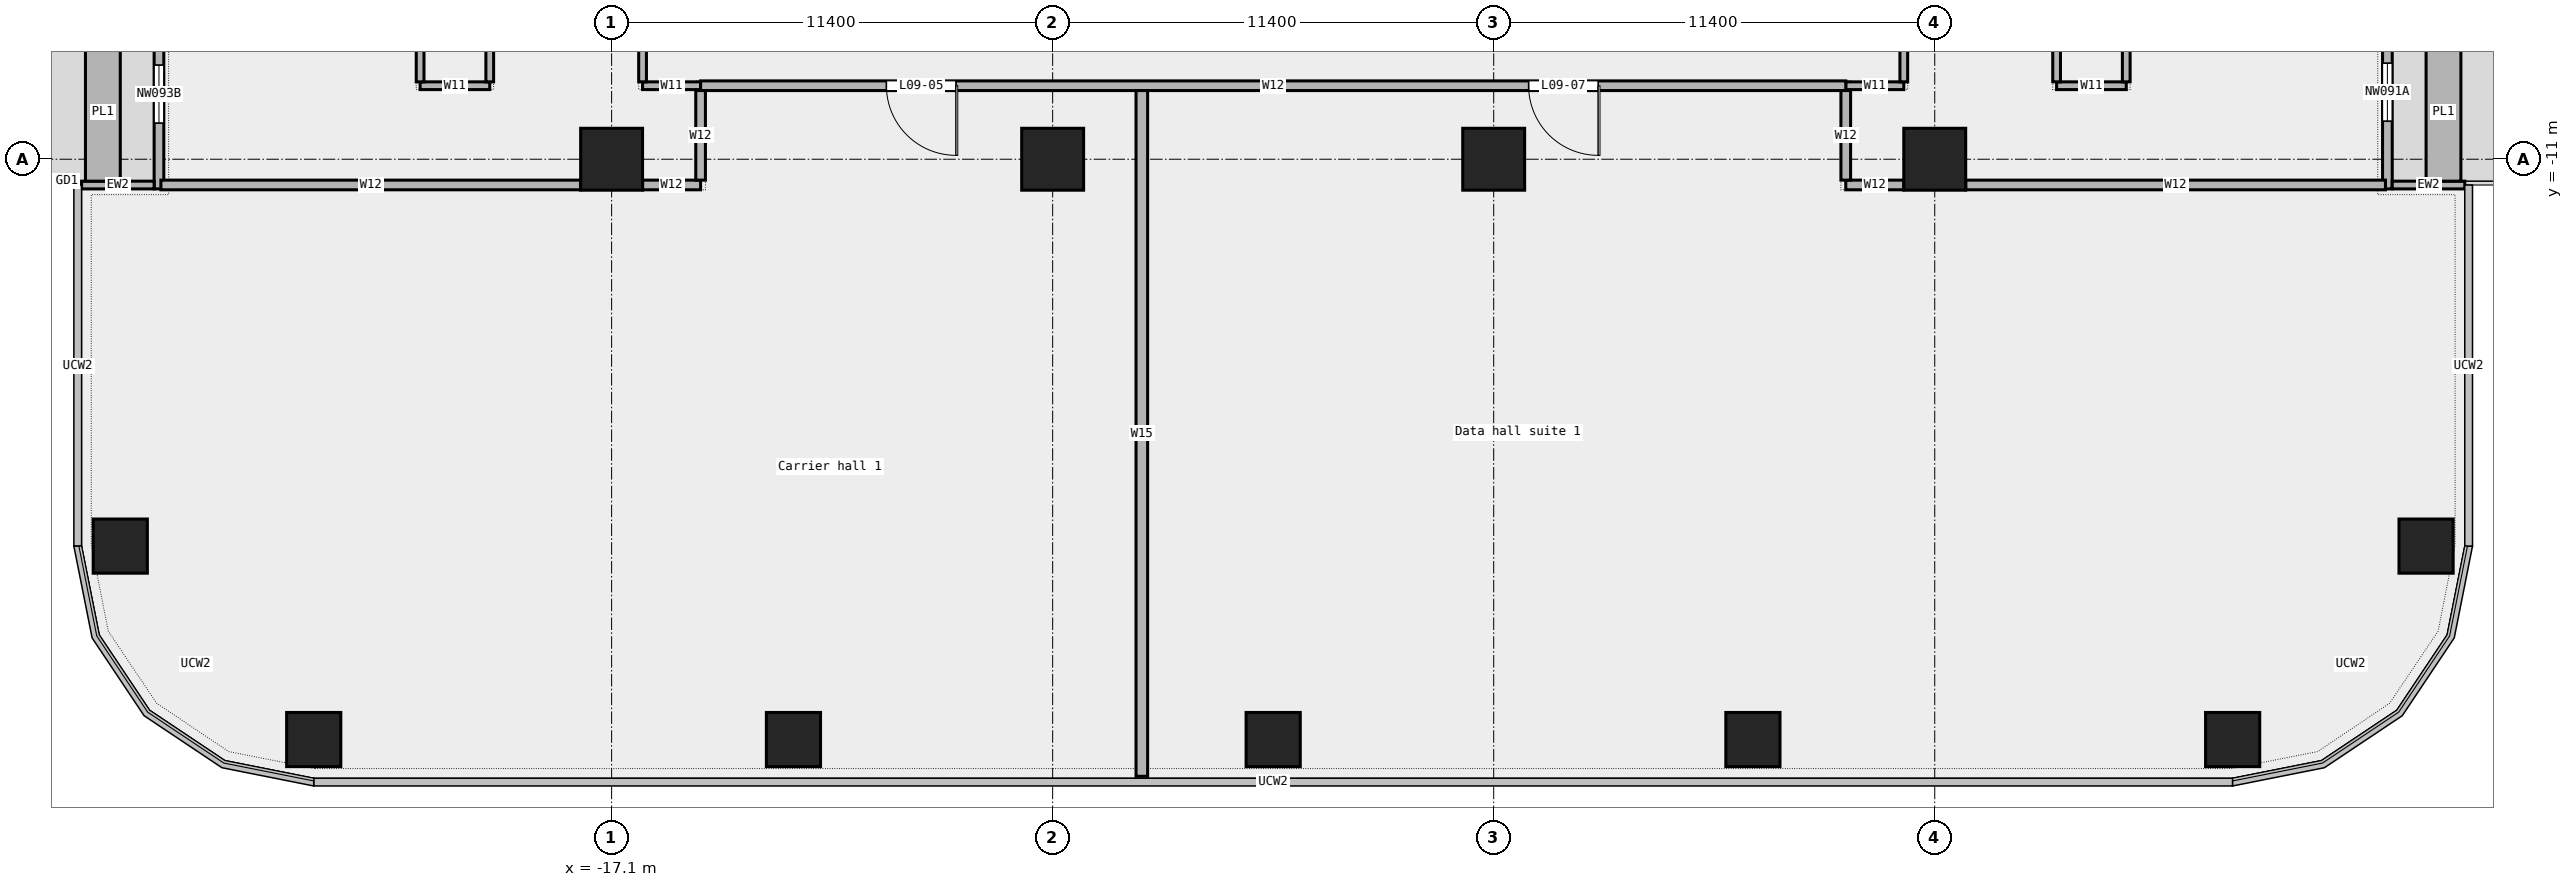
"""IFC4 building model, lengths in metres.
Left out: names, types, materials, properties, quantities, classifications, styles, units other than length and angle.
Written with IfcOpenShell. Run it as: python <this file> out.ifc"""

import sys

from ifc_helpers import new_model, si_unit, direction, frame, frame_2d, origin, origin_2d, place, context, subcontext, project, spatial, rectangle, extrude, element, fill, save


model = new_model("IFC4")
c1 = context("Model", 3, precision=1e-05, world=origin(), true_north=direction((0.0, 1.0)))
c2 = subcontext(c1, "Body", "Model", "MODEL_VIEW")
j1 = project(units=[si_unit("LENGTHUNIT", "METRE"), si_unit("PLANEANGLEUNIT", "RADIAN")], contexts=[c1])
p1 = place(None, origin())
s1 = spatial("IfcSite", under=j1, at=p1, CompositionType="ELEMENT")
p2 = place(p1, origin())
s2 = spatial("IfcBuilding", under=s1, at=p2, CompositionType="ELEMENT")
p3 = place(p2, frame((0.0, 0.0, 50.2)))
s3 = spatial("IfcBuildingStorey", under=s2, at=p3, CompositionType="ELEMENT", Elevation=50.2)
for number, where, z_axis, x_axis in (
    (1, (-24.8, -26.0, 0.0), (0.0, 0.0, 1.0), (1.0, 0.0, 0.0)),
    (2, (-12.4, -26.0, 0.0), (0.0, 0.0, 1.0), (1.0, 0.0, 0.0)),
    (3, (0.0, -26.0, 0.0), (0.0, 0.0, 1.0), (1.0, 0.0, 0.0)),
    (4, (12.4, -26.0, 0.0), (0.0, 0.0, 1.0), (1.0, 0.0, 0.0)),
    (5, (24.8, -26.0, 0.0), (0.0, 0.0, 1.0), (1.0, 0.0, 0.0)),
    (6, (29.8, -21.0, 0.0), (0.0, 0.0, 1.0), (1.0, 0.0, 0.0)),
    (7, (-29.8, -21.0, 0.0), (0.0, 0.0, 1.0), (1.0, 0.0, 0.0)),
):
    element("IfcColumn", number, at=place(p3, frame(where, z_axis=z_axis, x_axis=x_axis)), inside=s3, PredefinedType="COLUMN", context=c2, shape_type="SweptSolid", body=[
        extrude(rectangle(XDim=1.4, YDim=1.4, at=origin_2d()), origin(), (0.0, 0.0, 1.0), 4.35),
    ])
for number, where, z_axis, x_axis in (
    (8, (-17.1, -11.0, 0.0), (0.0, 0.0, 1.0), (1.0, 0.0, 0.0)),
    (9, (-5.7, -11.0, 0.0), (0.0, 0.0, 1.0), (1.0, 0.0, 0.0)),
    (10, (5.7, -11.0, 0.0), (0.0, 0.0, 1.0), (1.0, 0.0, 0.0)),
    (11, (17.1, -11.0, 0.0), (0.0, 0.0, 1.0), (1.0, 0.0, 0.0)),
):
    element("IfcColumn", number, at=place(p3, frame(where, z_axis=z_axis, x_axis=x_axis)), inside=s3, PredefinedType="COLUMN", context=c2, shape_type="SweptSolid", body=[
        extrude(rectangle(XDim=1.6, YDim=1.6, at=origin_2d()), origin(), (0.0, 0.0, 1.0), 4.35),
    ])
p4 = place(p3, frame((28.8, -11.767, 0.0), z_axis=(0.0, 0.0, 1.0), x_axis=(0.0, 1.0, 0.0)))
e12 = element("IfcWall", 12, at=p4, inside=s3, PredefinedType="STANDARD", context=c2, shape_type="SweptSolid", body=[
    extrude(rectangle(XDim=14.2, YDim=0.25, at=frame_2d((7.1, 0.0))), origin(), (0.0, 0.0, 1.0), 4.35),
])
p5 = place(p4, frame((1.75, 0.0, 0.45)))
e13 = element("IfcOpeningElement", 13, at=p5, cuts=e12, PredefinedType="OPENING", context=c2, shape_type="SweptSolid", body=[
    extrude(rectangle(XDim=1.5, YDim=3.0, at=frame_2d((0.75, 1.5))), frame((0.0, 0.137, 0.0), z_axis=(0.0, -1.0, 0.0), x_axis=(1.0, 0.0, 0.0)), (0.0, 0.0, 1.0), 0.274),
])
p6 = place(p4, frame((6.25, 0.0, 0.0)))
e14 = element("IfcOpeningElement", 14, at=p6, cuts=e12, PredefinedType="OPENING", context=c2, shape_type="SweptSolid", body=[
    extrude(rectangle(XDim=1.8, YDim=2.4, at=frame_2d((0.9, 1.2))), frame((0.0, 0.137, 0.0), z_axis=(0.0, -1.0, 0.0), x_axis=(1.0, 0.0, 0.0)), (0.0, 0.0, 1.0), 0.274),
])
p7 = place(p4, frame((11.0, 0.0, 0.45)))
e15 = element("IfcOpeningElement", 15, at=p7, cuts=e12, PredefinedType="OPENING", context=c2, shape_type="SweptSolid", body=[
    extrude(rectangle(XDim=1.5, YDim=3.0, at=frame_2d((0.75, 1.5))), frame((0.0, 0.137, 0.0), z_axis=(0.0, -1.0, 0.0), x_axis=(1.0, 0.0, 0.0)), (0.0, 0.0, 1.0), 0.274),
])
p8 = place(p3, frame((30.8, -11.667, 0.0), z_axis=(0.0, 0.0, 1.0), x_axis=(-1.0, 0.0, 0.0)))
e16 = element("IfcWall", 16, at=p8, inside=s3, PredefinedType="STANDARD", context=c2, shape_type="SweptSolid", body=[
    extrude(rectangle(XDim=1.875, YDim=0.2, at=frame_2d((0.938, 0.0))), origin(), (0.0, 0.0, 1.0), 4.35),
])
p9 = place(p3, frame((30.25, -11.567, 0.0), z_axis=(0.0, 0.0, 1.0), x_axis=(0.0, 1.0, 0.0)))
e17 = element("IfcWall", 17, at=p9, inside=s3, PredefinedType="STANDARD", context=c2, shape_type="SweptSolid", body=[
    extrude(rectangle(XDim=3.6, YDim=0.9, at=frame_2d((1.8, 0.0))), origin(), (0.0, 0.0, 1.0), 0.7),
])
p10 = place(p3, frame((-28.8, 2.433, 0.0), z_axis=(0.0, 0.0, 1.0), x_axis=(0.0, -1.0, 0.0)))
e18 = element("IfcWall", 18, at=p10, inside=s3, PredefinedType="STANDARD", context=c2, shape_type="SweptSolid", body=[
    extrude(rectangle(XDim=14.2, YDim=0.25, at=frame_2d((7.1, 0.0))), origin(), (0.0, 0.0, 1.0), 4.35),
])
p11 = place(p10, frame((1.75, 0.0, 0.45)))
e19 = element("IfcOpeningElement", 19, at=p11, cuts=e18, PredefinedType="OPENING", context=c2, shape_type="SweptSolid", body=[
    extrude(rectangle(XDim=1.5, YDim=3.0, at=frame_2d((0.75, 1.5))), frame((0.0, 0.137, 0.0), z_axis=(0.0, -1.0, 0.0), x_axis=(1.0, 0.0, 0.0)), (0.0, 0.0, 1.0), 0.274),
])
p12 = place(p10, frame((6.25, 0.0, 0.0)))
e20 = element("IfcOpeningElement", 20, at=p12, cuts=e18, PredefinedType="OPENING", context=c2, shape_type="SweptSolid", body=[
    extrude(rectangle(XDim=1.8, YDim=2.4, at=frame_2d((0.9, 1.2))), frame((0.0, 0.137, 0.0), z_axis=(0.0, -1.0, 0.0), x_axis=(1.0, 0.0, 0.0)), (0.0, 0.0, 1.0), 0.274),
])
p13 = place(p10, frame((11.0, 0.0, 0.45)))
e21 = element("IfcOpeningElement", 21, at=p13, cuts=e18, PredefinedType="OPENING", context=c2, shape_type="SweptSolid", body=[
    extrude(rectangle(XDim=1.5, YDim=3.0, at=frame_2d((0.75, 1.5))), frame((0.0, 0.137, 0.0), z_axis=(0.0, -1.0, 0.0), x_axis=(1.0, 0.0, 0.0)), (0.0, 0.0, 1.0), 0.274),
])
p14 = place(p3, frame((-30.8, -11.667, 0.0), z_axis=(0.0, 0.0, 1.0), x_axis=(1.0, 0.0, 0.0)))
e22 = element("IfcWall", 22, at=p14, inside=s3, PredefinedType="STANDARD", context=c2, shape_type="SweptSolid", body=[
    extrude(rectangle(XDim=1.875, YDim=0.2, at=frame_2d((0.938, 0.0))), origin(), (0.0, 0.0, 1.0), 4.35),
])
p15 = place(p3, frame((-30.25, -7.967, 0.0), z_axis=(0.0, 0.0, 1.0), x_axis=(0.0, -1.0, 0.0)))
e23 = element("IfcWall", 23, at=p15, inside=s3, PredefinedType="STANDARD", context=c2, shape_type="SweptSolid", body=[
    extrude(rectangle(XDim=3.6, YDim=0.9, at=frame_2d((1.8, 0.0))), origin(), (0.0, 0.0, 1.0), 0.7),
])
p16 = place(p3, frame((-28.75, -11.665, 0.0), z_axis=(0.0, 0.0, 1.0), x_axis=(1.0, 0.0, 0.0)))
e24 = element("IfcWall", 24, at=p16, inside=s3, PredefinedType="PARTITIONING", context=c2, shape_type="SweptSolid", body=[
    extrude(rectangle(XDim=10.85, YDim=0.25, at=frame_2d((5.425, 0.0))), origin(), (0.0, 0.0, 1.0), 4.35),
])
for number, where, z_axis, x_axis in (
    (25, (-16.3, -11.665, 0.0), (0.0, 0.0, 1.0), (1.0, 0.0, 0.0)),
    (26, (14.8, -11.665, 0.0), (0.0, 0.0, 1.0), (1.0, 0.0, 0.0)),
):
    element("IfcWall", number, at=place(p3, frame(where, z_axis=z_axis, x_axis=x_axis)), inside=s3, PredefinedType="PARTITIONING", context=c2, shape_type="SweptSolid", body=[
        extrude(rectangle(XDim=1.5, YDim=0.25, at=frame_2d((0.75, 0.0))), origin(), (0.0, 0.0, 1.0), 4.35),
    ])
p17 = place(p3, frame((17.9, -11.665, 0.0), z_axis=(0.0, 0.0, 1.0), x_axis=(1.0, 0.0, 0.0)))
e27 = element("IfcWall", 27, at=p17, inside=s3, PredefinedType="PARTITIONING", context=c2, shape_type="SweptSolid", body=[
    extrude(rectangle(XDim=10.85, YDim=0.25, at=frame_2d((5.425, 0.0))), origin(), (0.0, 0.0, 1.0), 4.35),
])
p18 = place(p3, frame((-22.05, -9.1, 0.0), z_axis=(0.0, 0.0, 1.0), x_axis=(1.0, 0.0, 0.0)))
e28 = element("IfcWall", 28, at=p18, inside=s3, PredefinedType="PARTITIONING", context=c2, shape_type="SweptSolid", body=[
    extrude(rectangle(XDim=1.8, YDim=0.2, at=frame_2d((0.9, 0.0))), origin(), (0.0, 0.0, 1.0), 4.35),
])
for number, where, z_axis, x_axis in (
    (29, (-16.3, -9.1, 0.0), (0.0, 0.0, 1.0), (1.0, 0.0, 0.0)),
    (30, (14.8, -9.1, 0.0), (0.0, 0.0, 1.0), (1.0, 0.0, 0.0)),
):
    element("IfcWall", number, at=place(p3, frame(where, z_axis=z_axis, x_axis=x_axis)), inside=s3, PredefinedType="PARTITIONING", context=c2, shape_type="SweptSolid", body=[
        extrude(rectangle(XDim=1.5, YDim=0.2, at=frame_2d((0.75, 0.0))), origin(), (0.0, 0.0, 1.0), 4.35),
    ])
p19 = place(p3, frame((20.25, -9.1, 0.0), z_axis=(0.0, 0.0, 1.0), x_axis=(1.0, 0.0, 0.0)))
e31 = element("IfcWall", 31, at=p19, inside=s3, PredefinedType="PARTITIONING", context=c2, shape_type="SweptSolid", body=[
    extrude(rectangle(XDim=1.8, YDim=0.2, at=frame_2d((0.9, 0.0))), origin(), (0.0, 0.0, 1.0), 4.35),
])
p20 = place(p3, frame((-14.8, -9.1, 0.0), z_axis=(0.0, 0.0, 1.0), x_axis=(1.0, 0.0, 0.0)))
e32 = element("IfcWall", 32, at=p20, inside=s3, PredefinedType="PARTITIONING", context=c2, shape_type="SweptSolid", body=[
    extrude(rectangle(XDim=29.6, YDim=0.25, at=frame_2d((14.8, 0.0))), origin(), (0.0, 0.0, 1.0), 4.35),
])
p21 = place(p20, frame((4.802, 0.0, 0.0)))
e33 = element("IfcOpeningElement", 33, at=p21, cuts=e32, PredefinedType="OPENING", context=c2, shape_type="SweptSolid", body=[
    extrude(rectangle(XDim=1.8, YDim=2.1, at=frame_2d((0.9, 1.05))), frame((0.0, 0.137, 0.0), z_axis=(0.0, -1.0, 0.0), x_axis=(1.0, 0.0, 0.0)), (0.0, 0.0, 1.0), 0.274),
])
p22 = place(p20, frame((21.403, 0.0, 0.0)))
e34 = element("IfcOpeningElement", 34, at=p22, cuts=e32, PredefinedType="OPENING", context=c2, shape_type="SweptSolid", body=[
    extrude(rectangle(XDim=1.8, YDim=2.1, at=frame_2d((0.9, 1.05))), frame((0.0, 0.137, 0.0), z_axis=(0.0, -1.0, 0.0), x_axis=(1.0, 0.0, 0.0)), (0.0, 0.0, 1.0), 0.274),
])
p23 = place(p3, frame((-22.05, -9.0, 0.0), z_axis=(0.0, 0.0, 1.0), x_axis=(0.0, 1.0, 0.0)))
e35 = element("IfcWall", 35, at=p23, inside=s3, PredefinedType="PARTITIONING", context=c2, shape_type="SweptSolid", body=[
    extrude(rectangle(XDim=24.3, YDim=0.2, at=frame_2d((12.15, 0.0))), origin(), (0.0, 0.0, 1.0), 4.35),
])
p24 = place(p23, frame((17.067, 0.0, 0.0)))
e36 = element("IfcOpeningElement", 36, at=p24, cuts=e35, PredefinedType="OPENING", context=c2, shape_type="SweptSolid", body=[
    extrude(rectangle(XDim=1.5, YDim=2.1, at=frame_2d((0.75, 1.05))), frame((0.0, 0.112, 0.0), z_axis=(0.0, -1.0, 0.0), x_axis=(1.0, 0.0, 0.0)), (0.0, 0.0, 1.0), 0.224),
])
p25 = place(p23, frame((4.768, 0.0, 0.0)))
e37 = element("IfcOpeningElement", 37, at=p25, cuts=e35, PredefinedType="OPENING", context=c2, shape_type="SweptSolid", body=[
    extrude(rectangle(XDim=1.8, YDim=2.1, at=frame_2d((0.9, 1.05))), frame((0.0, 0.112, 0.0), z_axis=(0.0, -1.0, 0.0), x_axis=(1.0, 0.0, 0.0)), (0.0, 0.0, 1.0), 0.224),
])
p26 = place(p3, frame((-20.25, -9.0, 0.0), z_axis=(0.0, 0.0, 1.0), x_axis=(0.0, 1.0, 0.0)))
e38 = element("IfcWall", 38, at=p26, inside=s3, PredefinedType="PARTITIONING", context=c2, shape_type="SweptSolid", body=[
    extrude(rectangle(XDim=11.15, YDim=0.2, at=frame_2d((5.575, 0.0))), origin(), (0.0, 0.0, 1.0), 4.35),
])
p27 = place(p3, frame((-16.3, -9.0, 0.0), z_axis=(0.0, 0.0, 1.0), x_axis=(0.0, 1.0, 0.0)))
e39 = element("IfcWall", 39, at=p27, inside=s3, PredefinedType="PARTITIONING", context=c2, shape_type="SweptSolid", body=[
    extrude(rectangle(XDim=8.2, YDim=0.2, at=frame_2d((4.1, 0.0))), origin(), (0.0, 0.0, 1.0), 4.35),
])
p28 = place(p3, frame((-14.8, -11.54, 0.0), z_axis=(0.0, 0.0, 1.0), x_axis=(0.0, 1.0, 0.0)))
e40 = element("IfcWall", 40, at=p28, inside=s3, PredefinedType="PARTITIONING", context=c2, shape_type="SweptSolid", body=[
    extrude(rectangle(XDim=2.315, YDim=0.25, at=frame_2d((1.157, 0.0))), origin(), (0.0, 0.0, 1.0), 4.35),
])
p29 = place(p3, frame((-3.395, -26.95, 0.0), z_axis=(0.0, 0.0, 1.0), x_axis=(0.0, 1.0, 0.0)))
e41 = element("IfcWall", 41, at=p29, inside=s3, PredefinedType="PARTITIONING", context=c2, shape_type="SweptSolid", body=[
    extrude(rectangle(XDim=17.725, YDim=0.3, at=frame_2d((8.862, 0.0))), origin(), (0.0, 0.0, 1.0), 4.35),
])
p30 = place(p3, frame((14.8, -11.54, 0.0), z_axis=(0.0, 0.0, 1.0), x_axis=(0.0, 1.0, 0.0)))
e42 = element("IfcWall", 42, at=p30, inside=s3, PredefinedType="PARTITIONING", context=c2, shape_type="SweptSolid", body=[
    extrude(rectangle(XDim=2.315, YDim=0.25, at=frame_2d((1.157, 0.0))), origin(), (0.0, 0.0, 1.0), 4.35),
])
p31 = place(p3, frame((16.3, -9.0, 0.0), z_axis=(0.0, 0.0, 1.0), x_axis=(0.0, 1.0, 0.0)))
e43 = element("IfcWall", 43, at=p31, inside=s3, PredefinedType="PARTITIONING", context=c2, shape_type="SweptSolid", body=[
    extrude(rectangle(XDim=8.2, YDim=0.2, at=frame_2d((4.1, 0.0))), origin(), (0.0, 0.0, 1.0), 4.35),
])
p32 = place(p3, frame((20.25, -9.0, 0.0), z_axis=(0.0, 0.0, 1.0), x_axis=(0.0, 1.0, 0.0)))
e44 = element("IfcWall", 44, at=p32, inside=s3, PredefinedType="PARTITIONING", context=c2, shape_type="SweptSolid", body=[
    extrude(rectangle(XDim=11.15, YDim=0.2, at=frame_2d((5.575, 0.0))), origin(), (0.0, 0.0, 1.0), 4.35),
])
p33 = place(p3, frame((22.05, -9.0, 0.0), z_axis=(0.0, 0.0, 1.0), x_axis=(0.0, 1.0, 0.0)))
e45 = element("IfcWall", 45, at=p33, inside=s3, PredefinedType="PARTITIONING", context=c2, shape_type="SweptSolid", body=[
    extrude(rectangle(XDim=11.21, YDim=0.2, at=frame_2d((5.605, 0.0))), origin(), (0.0, 0.0, 1.0), 4.35),
])
p34 = place(p33, frame((4.705, 0.0, 0.0)))
e46 = element("IfcOpeningElement", 46, at=p34, cuts=e45, PredefinedType="OPENING", context=c2, shape_type="SweptSolid", body=[
    extrude(rectangle(XDim=1.8, YDim=2.1, at=frame_2d((0.9, 1.05))), frame((0.0, 0.112, 0.0), z_axis=(0.0, -1.0, 0.0), x_axis=(1.0, 0.0, 0.0)), (0.0, 0.0, 1.0), 0.224),
])
p35 = place(p5, origin())
e47 = element("IfcWindow", 47, at=p35, inside=s3, PartitioningType="SINGLE_PANEL", PredefinedType="WINDOW", context=c2, shape_type="SweptSolid", body=[
    extrude(rectangle(XDim=1.5, YDim=3.0, at=frame_2d((0.75, 1.5))), frame((0.0, 0.03, 0.0), z_axis=(0.0, -1.0, 0.0), x_axis=(1.0, 0.0, 0.0)), (0.0, 0.0, 1.0), 0.06),
])
fill(e13, e47)
p36 = place(p13, origin())
e48 = element("IfcWindow", 48, at=p36, inside=s3, PartitioningType="SINGLE_PANEL", PredefinedType="WINDOW", context=c2, shape_type="SweptSolid", body=[
    extrude(rectangle(XDim=1.5, YDim=3.0, at=frame_2d((0.75, 1.5))), frame((0.0, 0.03, 0.0), z_axis=(0.0, -1.0, 0.0), x_axis=(1.0, 0.0, 0.0)), (0.0, 0.0, 1.0), 0.06),
])
fill(e21, e48)
p37 = place(p21, origin())
e49 = element("IfcDoor", 49, at=p37, inside=s3, OperationType="DOUBLE_DOOR_SINGLE_SWING", PredefinedType="DOOR", context=c2, shape_type="SweptSolid", body=[
    extrude(rectangle(XDim=1.8, YDim=2.1, at=frame_2d((0.9, 1.05))), frame((0.0, 0.025, 0.0), z_axis=(0.0, -1.0, 0.0), x_axis=(1.0, 0.0, 0.0)), (0.0, 0.0, 1.0), 0.05),
])
fill(e33, e49)
p38 = place(p22, origin())
e50 = element("IfcDoor", 50, at=p38, inside=s3, OperationType="DOUBLE_DOOR_SINGLE_SWING", PredefinedType="DOOR", context=c2, shape_type="SweptSolid", body=[
    extrude(rectangle(XDim=1.8, YDim=2.1, at=frame_2d((0.9, 1.05))), frame((0.0, 0.025, 0.0), z_axis=(0.0, -1.0, 0.0), x_axis=(1.0, 0.0, 0.0)), (0.0, 0.0, 1.0), 0.05),
])
fill(e34, e50)
save(model, sys.argv[1])
